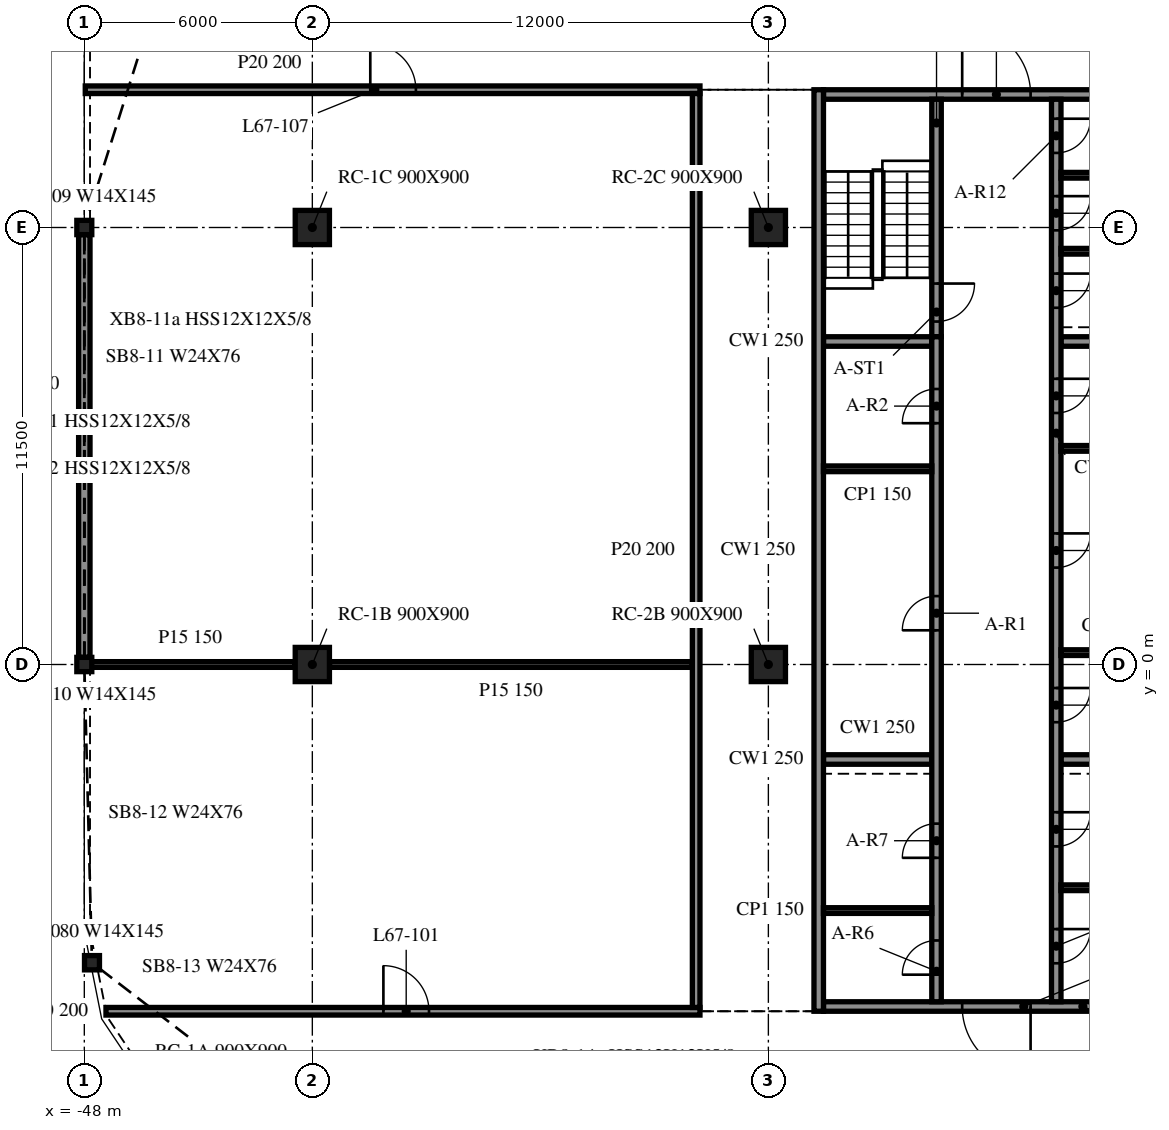
"""IFC4 building model, lengths in metres.
Left out: names, types, materials, properties, quantities, classifications, styles, units other than length and angle.
Written with IfcOpenShell. Run it as: python <this file> out.ifc"""

import sys

from ifc_helpers import new_model, si_unit, direction, frame, frame_2d, origin, origin_2d, place, context, subcontext, project, spatial, rectangle, i_section, extrude, element, fill, save


model = new_model("IFC4")
c1 = context("Model", 3, precision=1e-05, world=origin(), true_north=direction((0.0, 1.0)))
c2 = subcontext(c1, "Body", "Model", "MODEL_VIEW")
j1 = project(units=[si_unit("LENGTHUNIT", "METRE"), si_unit("PLANEANGLEUNIT", "RADIAN")], contexts=[c1])
p1 = place(None, origin())
s1 = spatial("IfcSite", under=j1, at=p1, CompositionType="ELEMENT")
p2 = place(p1, origin())
s2 = spatial("IfcBuilding", under=s1, at=p2, CompositionType="ELEMENT")
p3 = place(p2, frame((0.0, 0.0, 274.7)))
s3 = spatial("IfcBuildingStorey", under=s2, at=p3, CompositionType="ELEMENT", Elevation=274.7)
for number, where, z_axis, x_axis in (
    (1, (-42.0, 0.0, -0.34), (0.0, 0.0, 1.0), (1.0, 0.0, 0.0)),
    (2, (-42.0, 11.5, -0.34), (0.0, 0.0, 1.0), (1.0, 0.0, 0.0)),
    (3, (-30.0, 0.0, -0.34), (0.0, 0.0, 1.0), (1.0, 0.0, 0.0)),
    (4, (-30.0, 11.5, -0.34), (0.0, 0.0, 1.0), (1.0, 0.0, 0.0)),
):
    element("IfcColumn", number, at=place(p3, frame(where, z_axis=z_axis, x_axis=x_axis)), inside=s3, PredefinedType="COLUMN", context=c2, shape_type="SweptSolid", body=[
        extrude(rectangle(XDim=0.9, YDim=0.9, at=origin_2d()), origin(), (0.0, 0.0, 1.0), 3.8),
    ])
for number, where, z_axis, x_axis in (
    (5, (-48.0, 11.5, -0.34), (0.0, 0.0, 1.0), (1.0, 0.0, 0.0)),
    (6, (-48.0, 0.0, -0.34), (0.0, 0.0, 1.0), (1.0, 0.0, 0.0)),
    (7, (-47.798, -7.848, -0.34), (0.0, 0.0, 1.0), (1.0, 0.0, 0.0)),
):
    element("IfcColumn", number, at=place(p3, frame(where, z_axis=z_axis, x_axis=x_axis)), inside=s3, PredefinedType="COLUMN", context=c2, shape_type="SweptSolid", body=[
        extrude(i_section(OverallWidth=0.394, OverallDepth=0.376, WebThickness=0.017, FlangeThickness=0.028, at=origin_2d()), origin(), (0.0, 0.0, 1.0), 3.8),
    ])
p4 = place(p3, frame((-48.0, 11.312, 0.0), z_axis=(0.0, 0.0, 1.0), x_axis=(0.0, -1.0, 0.0)))
e8 = element("IfcWall", 8, at=p4, inside=s3, PredefinedType="NOTDEFINED", context=c2, shape_type="SweptSolid", body=[
    extrude(rectangle(XDim=11.124, YDim=0.3, at=frame_2d((5.562, 0.0))), origin(), (0.0, 0.0, 1.0), 2.853),
])
p5 = place(p3, frame((-28.675, 15.125, 0.0), z_axis=(0.0, 0.0, 1.0), x_axis=(0.0, -1.0, 0.0)))
e9 = element("IfcWall", 9, at=p5, inside=s3, PredefinedType="SOLIDWALL", context=c2, shape_type="SweptSolid", body=[
    extrude(rectangle(XDim=24.25, YDim=0.25, at=frame_2d((12.125, 0.0))), origin(), (0.0, 0.0, 1.0), 3.46),
])
p6 = place(p3, frame((-19.45, -9.0, 0.0), z_axis=(0.0, 0.0, 1.0), x_axis=(-1.0, 0.0, 0.0)))
e10 = element("IfcWall", 10, at=p6, inside=s3, PredefinedType="SOLIDWALL", context=c2, shape_type="SweptSolid", body=[
    extrude(rectangle(XDim=9.1, YDim=0.25, at=frame_2d((4.55, 0.0))), origin(), (0.0, 0.0, 1.0), 3.46),
])
p7 = place(p6, frame((3.65, 0.0, 0.0)))
e11 = element("IfcOpeningElement", 11, at=p7, cuts=e10, PredefinedType="OPENING", context=c2, shape_type="SweptSolid", body=[
    extrude(rectangle(XDim=1.8, YDim=2.1, at=frame_2d((0.9, 1.05))), frame((0.0, 0.135, 0.0), z_axis=(0.0, -1.0, 0.0), x_axis=(1.0, 0.0, 0.0)), (0.0, 0.0, 1.0), 0.27),
])
p8 = place(p3, frame((-28.55, 15.0, 0.0), z_axis=(0.0, 0.0, 1.0), x_axis=(1.0, 0.0, 0.0)))
e12 = element("IfcWall", 12, at=p8, inside=s3, PredefinedType="SOLIDWALL", context=c2, shape_type="SweptSolid", body=[
    extrude(rectangle(XDim=9.1, YDim=0.25, at=frame_2d((4.55, 0.0))), origin(), (0.0, 0.0, 1.0), 3.46),
])
p9 = place(p8, frame((3.65, 0.0, 0.0)))
e13 = element("IfcOpeningElement", 13, at=p9, cuts=e12, PredefinedType="OPENING", context=c2, shape_type="SweptSolid", body=[
    extrude(rectangle(XDim=1.8, YDim=2.1, at=frame_2d((0.9, 1.05))), frame((0.0, 0.135, 0.0), z_axis=(0.0, -1.0, 0.0), x_axis=(1.0, 0.0, 0.0)), (0.0, 0.0, 1.0), 0.27),
])
p10 = place(p3, frame((-25.575, -8.875, 0.0), z_axis=(0.0, 0.0, 1.0), x_axis=(0.0, 1.0, 0.0)))
e14 = element("IfcWall", 14, at=p10, inside=s3, PredefinedType="SOLIDWALL", context=c2, shape_type="SweptSolid", body=[
    extrude(rectangle(XDim=17.5, YDim=0.25, at=frame_2d((8.75, 0.0))), origin(), (0.0, 0.0, 1.0), 3.46),
])
p11 = place(p10, frame((9.775, 0.0, 0.0)))
e15 = element("IfcOpeningElement", 15, at=p11, cuts=e14, PredefinedType="OPENING", context=c2, shape_type="SweptSolid", body=[
    extrude(rectangle(XDim=0.9, YDim=2.1, at=frame_2d((0.45, 1.05))), frame((0.0, 0.135, 0.0), z_axis=(0.0, -1.0, 0.0), x_axis=(1.0, 0.0, 0.0)), (0.0, 0.0, 1.0), 0.27),
])
p12 = place(p10, frame((15.225, 0.0, 0.0)))
e16 = element("IfcOpeningElement", 16, at=p12, cuts=e14, PredefinedType="OPENING", context=c2, shape_type="SweptSolid", body=[
    extrude(rectangle(XDim=0.9, YDim=2.1, at=frame_2d((0.45, 1.05))), frame((0.0, 0.135, 0.0), z_axis=(0.0, -1.0, 0.0), x_axis=(1.0, 0.0, 0.0)), (0.0, 0.0, 1.0), 0.27),
])
p13 = place(p10, frame((0.712, 0.0, 0.0)))
e17 = element("IfcOpeningElement", 17, at=p13, cuts=e14, PredefinedType="OPENING", context=c2, shape_type="SweptSolid", body=[
    extrude(rectangle(XDim=0.9, YDim=2.1, at=frame_2d((0.45, 1.05))), frame((0.0, 0.135, 0.0), z_axis=(0.0, -1.0, 0.0), x_axis=(1.0, 0.0, 0.0)), (0.0, 0.0, 1.0), 0.27),
])
p14 = place(p10, frame((3.788, 0.0, 0.0)))
e18 = element("IfcOpeningElement", 18, at=p14, cuts=e14, PredefinedType="OPENING", context=c2, shape_type="SweptSolid", body=[
    extrude(rectangle(XDim=0.9, YDim=2.1, at=frame_2d((0.45, 1.05))), frame((0.0, 0.135, 0.0), z_axis=(0.0, -1.0, 0.0), x_axis=(1.0, 0.0, 0.0)), (0.0, 0.0, 1.0), 0.27),
])
p15 = place(p3, frame((-25.575, 14.875, 0.0), z_axis=(0.0, 0.0, 1.0), x_axis=(0.0, -1.0, 0.0)))
e19 = element("IfcWall", 19, at=p15, inside=s3, PredefinedType="SOLIDWALL", context=c2, shape_type="SweptSolid", body=[
    extrude(rectangle(XDim=6.25, YDim=0.25, at=frame_2d((3.125, 0.0))), origin(), (0.0, 0.0, 1.0), 3.46),
])
p16 = place(p15, frame((4.85, 0.0, 0.0)))
e20 = element("IfcOpeningElement", 20, at=p16, cuts=e19, PredefinedType="OPENING", context=c2, shape_type="SweptSolid", body=[
    extrude(rectangle(XDim=1.0, YDim=2.1, at=frame_2d((0.5, 1.05))), frame((0.0, 0.135, 0.0), z_axis=(0.0, -1.0, 0.0), x_axis=(1.0, 0.0, 0.0)), (0.0, 0.0, 1.0), 0.27),
])
p17 = place(p3, frame((-22.425, 14.875, 0.0), z_axis=(0.0, 0.0, 1.0), x_axis=(0.0, -1.0, 0.0)))
e21 = element("IfcWall", 21, at=p17, inside=s3, PredefinedType="SOLIDWALL", context=c2, shape_type="SweptSolid", body=[
    extrude(rectangle(XDim=23.75, YDim=0.25, at=frame_2d((11.875, 0.0))), origin(), (0.0, 0.0, 1.0), 3.46),
])
p18 = place(p17, frame((15.494, 0.0, 0.0)))
e22 = element("IfcOpeningElement", 22, at=p18, cuts=e21, PredefinedType="OPENING", context=c2, shape_type="SweptSolid", body=[
    extrude(rectangle(XDim=0.9, YDim=2.1, at=frame_2d((0.45, 1.05))), frame((0.0, 0.135, 0.0), z_axis=(0.0, -1.0, 0.0), x_axis=(1.0, 0.0, 0.0)), (0.0, 0.0, 1.0), 0.27),
])
p19 = place(p17, frame((11.425, 0.0, 0.0)))
e23 = element("IfcOpeningElement", 23, at=p19, cuts=e21, PredefinedType="OPENING", context=c2, shape_type="SweptSolid", body=[
    extrude(rectangle(XDim=0.9, YDim=2.1, at=frame_2d((0.45, 1.05))), frame((0.0, 0.135, 0.0), z_axis=(0.0, -1.0, 0.0), x_axis=(1.0, 0.0, 0.0)), (0.0, 0.0, 1.0), 0.27),
])
p20 = place(p17, frame((7.356, 0.0, 0.0)))
e24 = element("IfcOpeningElement", 24, at=p20, cuts=e21, PredefinedType="OPENING", context=c2, shape_type="SweptSolid", body=[
    extrude(rectangle(XDim=0.9, YDim=2.1, at=frame_2d((0.45, 1.05))), frame((0.0, 0.135, 0.0), z_axis=(0.0, -1.0, 0.0), x_axis=(1.0, 0.0, 0.0)), (0.0, 0.0, 1.0), 0.27),
])
p21 = place(p17, frame((21.837, 0.0, 0.0)))
e25 = element("IfcOpeningElement", 25, at=p21, cuts=e21, PredefinedType="OPENING", context=c2, shape_type="SweptSolid", body=[
    extrude(rectangle(XDim=0.9, YDim=2.1, at=frame_2d((0.45, 1.05))), frame((0.0, 0.135, 0.0), z_axis=(0.0, -1.0, 0.0), x_axis=(1.0, 0.0, 0.0)), (0.0, 0.0, 1.0), 0.27),
])
p22 = place(p17, frame((18.762, 0.0, 0.0)))
e26 = element("IfcOpeningElement", 26, at=p22, cuts=e21, PredefinedType="OPENING", context=c2, shape_type="SweptSolid", body=[
    extrude(rectangle(XDim=0.9, YDim=2.1, at=frame_2d((0.45, 1.05))), frame((0.0, 0.135, 0.0), z_axis=(0.0, -1.0, 0.0), x_axis=(1.0, 0.0, 0.0)), (0.0, 0.0, 1.0), 0.27),
])
p23 = place(p17, frame((4.587, 0.0, 0.0)))
e27 = element("IfcOpeningElement", 27, at=p23, cuts=e21, PredefinedType="OPENING", context=c2, shape_type="SweptSolid", body=[
    extrude(rectangle(XDim=0.9, YDim=2.1, at=frame_2d((0.45, 1.05))), frame((0.0, 0.135, 0.0), z_axis=(0.0, -1.0, 0.0), x_axis=(1.0, 0.0, 0.0)), (0.0, 0.0, 1.0), 0.27),
])
p24 = place(p17, frame((2.55, 0.0, 0.0)))
e28 = element("IfcOpeningElement", 28, at=p24, cuts=e21, PredefinedType="OPENING", context=c2, shape_type="SweptSolid", body=[
    extrude(rectangle(XDim=0.9, YDim=2.1, at=frame_2d((0.45, 1.05))), frame((0.0, 0.135, 0.0), z_axis=(0.0, -1.0, 0.0), x_axis=(1.0, 0.0, 0.0)), (0.0, 0.0, 1.0), 0.27),
])
p25 = place(p17, frame((0.512, 0.0, 0.0)))
e29 = element("IfcOpeningElement", 29, at=p25, cuts=e21, PredefinedType="OPENING", context=c2, shape_type="SweptSolid", body=[
    extrude(rectangle(XDim=0.9, YDim=2.1, at=frame_2d((0.45, 1.05))), frame((0.0, 0.135, 0.0), z_axis=(0.0, -1.0, 0.0), x_axis=(1.0, 0.0, 0.0)), (0.0, 0.0, 1.0), 0.27),
])
for number, where, z_axis, x_axis in (
    (30, (-28.55, -2.5, 0.0), (0.0, 0.0, 1.0), (1.0, 0.0, 0.0)),
    (31, (-28.55, 8.5, 0.0), (0.0, 0.0, 1.0), (1.0, 0.0, 0.0)),
    (32, (-22.3, -2.5, 0.0), (0.0, 0.0, 1.0), (1.0, 0.0, 0.0)),
    (33, (-22.3, 8.5, 0.0), (0.0, 0.0, 1.0), (1.0, 0.0, 0.0)),
):
    element("IfcWall", number, at=place(p3, frame(where, z_axis=z_axis, x_axis=x_axis)), inside=s3, PredefinedType="SOLIDWALL", context=c2, shape_type="SweptSolid", body=[
        extrude(rectangle(XDim=2.85, YDim=0.25, at=frame_2d((1.425, 0.0))), origin(), (0.0, 0.0, 1.0), 3.46),
    ])
for number, where, z_axis, x_axis in (
    (34, (-28.55, 5.15, 0.0), (0.0, 0.0, 1.0), (1.0, 0.0, 0.0)),
    (35, (-22.3, 0.312, 0.0), (0.0, 0.0, 1.0), (1.0, 0.0, 0.0)),
    (36, (-22.3, 5.688, 0.0), (0.0, 0.0, 1.0), (1.0, 0.0, 0.0)),
    (37, (-28.55, -6.475, 0.0), (0.0, 0.0, 1.0), (1.0, 0.0, 0.0)),
    (38, (-22.3, -5.875, 0.0), (0.0, 0.0, 1.0), (1.0, 0.0, 0.0)),
    (39, (-22.3, 10.875, 0.0), (0.0, 0.0, 1.0), (1.0, 0.0, 0.0)),
    (40, (-22.3, 12.875, 0.0), (0.0, 0.0, 1.0), (1.0, 0.0, 0.0)),
):
    element("IfcWall", number, at=place(p3, frame(where, z_axis=z_axis, x_axis=x_axis)), inside=s3, PredefinedType="PARTITIONING", context=c2, shape_type="SweptSolid", body=[
        extrude(rectangle(XDim=2.85, YDim=0.15, at=frame_2d((1.425, 0.0))), origin(), (0.0, 0.0, 1.0), 3.46),
    ])
p26 = place(p3, frame((-47.43, -9.125, 0.0), z_axis=(0.0, 0.0, 1.0), x_axis=(1.0, 0.0, 0.0)))
e41 = element("IfcWall", 41, at=p26, inside=s3, PredefinedType="PARTITIONING", context=c2, shape_type="SweptSolid", body=[
    extrude(rectangle(XDim=15.63, YDim=0.2, at=frame_2d((7.815, 0.0))), origin(), (0.0, 0.0, 1.0), 3.46),
])
p27 = place(p26, frame((7.3, 0.0, 0.0)))
e42 = element("IfcOpeningElement", 42, at=p27, cuts=e41, PredefinedType="OPENING", context=c2, shape_type="SweptSolid", body=[
    extrude(rectangle(XDim=1.2, YDim=2.1, at=frame_2d((0.6, 1.05))), frame((0.0, 0.11, 0.0), z_axis=(0.0, -1.0, 0.0), x_axis=(1.0, 0.0, 0.0)), (0.0, 0.0, 1.0), 0.22),
])
p28 = place(p3, frame((-47.975, 0.0, 0.0), z_axis=(0.0, 0.0, 1.0), x_axis=(1.0, 0.0, 0.0)))
e43 = element("IfcWall", 43, at=p28, inside=s3, PredefinedType="PARTITIONING", context=c2, shape_type="SweptSolid", body=[
    extrude(rectangle(XDim=5.525, YDim=0.15, at=frame_2d((2.763, 0.0))), origin(), (0.0, 0.0, 1.0), 3.46),
])
p29 = place(p3, frame((-41.55, 0.0, 0.0), z_axis=(0.0, 0.0, 1.0), x_axis=(1.0, 0.0, 0.0)))
e44 = element("IfcWall", 44, at=p29, inside=s3, PredefinedType="PARTITIONING", context=c2, shape_type="SweptSolid", body=[
    extrude(rectangle(XDim=9.55, YDim=0.15, at=frame_2d((4.775, 0.0))), origin(), (0.0, 0.0, 1.0), 3.46),
])
p30 = place(p3, frame((-47.975, 15.125, 0.0), z_axis=(0.0, 0.0, 1.0), x_axis=(1.0, 0.0, 0.0)))
e45 = element("IfcWall", 45, at=p30, inside=s3, PredefinedType="PARTITIONING", context=c2, shape_type="SweptSolid", body=[
    extrude(rectangle(XDim=16.175, YDim=0.2, at=frame_2d((8.087, 0.0))), origin(), (0.0, 0.0, 1.0), 3.46),
])
p31 = place(p30, frame((7.5, 0.0, 0.0)))
e46 = element("IfcOpeningElement", 46, at=p31, cuts=e45, PredefinedType="OPENING", context=c2, shape_type="SweptSolid", body=[
    extrude(rectangle(XDim=1.2, YDim=2.1, at=frame_2d((0.6, 1.05))), frame((0.0, 0.11, 0.0), z_axis=(0.0, -1.0, 0.0), x_axis=(1.0, 0.0, 0.0)), (0.0, 0.0, 1.0), 0.22),
])
p32 = place(p3, frame((-31.9, -9.025, 0.0), z_axis=(0.0, 0.0, 1.0), x_axis=(0.0, 1.0, 0.0)))
e47 = element("IfcWall", 47, at=p32, inside=s3, PredefinedType="PARTITIONING", context=c2, shape_type="SweptSolid", body=[
    extrude(rectangle(XDim=24.05, YDim=0.2, at=frame_2d((12.025, 0.0))), origin(), (0.0, 0.0, 1.0), 3.46),
])
p33 = place(p7, origin())
e48 = element("IfcDoor", 48, at=p33, inside=s3, OperationType="DOUBLE_DOOR_SINGLE_SWING", PredefinedType="DOOR", context=c2, shape_type="SweptSolid", body=[
    extrude(rectangle(XDim=1.8, YDim=2.1, at=frame_2d((0.9, 1.05))), frame((0.0, 0.025, 0.0), z_axis=(0.0, -1.0, 0.0), x_axis=(1.0, 0.0, 0.0)), (0.0, 0.0, 1.0), 0.05),
])
fill(e11, e48)
p34 = place(p9, origin())
e49 = element("IfcDoor", 49, at=p34, inside=s3, OperationType="DOUBLE_DOOR_SINGLE_SWING", PredefinedType="DOOR", context=c2, shape_type="SweptSolid", body=[
    extrude(rectangle(XDim=1.8, YDim=2.1, at=frame_2d((0.9, 1.05))), frame((0.0, 0.025, 0.0), z_axis=(0.0, -1.0, 0.0), x_axis=(1.0, 0.0, 0.0)), (0.0, 0.0, 1.0), 0.05),
])
fill(e13, e49)
p35 = place(p11, origin())
e50 = element("IfcDoor", 50, at=p35, inside=s3, OperationType="SINGLE_SWING_LEFT", PredefinedType="DOOR", context=c2, shape_type="SweptSolid", body=[
    extrude(rectangle(XDim=0.9, YDim=2.1, at=frame_2d((0.45, 1.05))), frame((0.0, 0.025, 0.0), z_axis=(0.0, -1.0, 0.0), x_axis=(1.0, 0.0, 0.0)), (0.0, 0.0, 1.0), 0.05),
])
fill(e15, e50)
p36 = place(p12, origin())
e51 = element("IfcDoor", 51, at=p36, inside=s3, OperationType="SINGLE_SWING_RIGHT", PredefinedType="DOOR", context=c2, shape_type="SweptSolid", body=[
    extrude(rectangle(XDim=0.9, YDim=2.1, at=frame_2d((0.45, 1.05))), frame((0.0, 0.025, 0.0), z_axis=(0.0, -1.0, 0.0), x_axis=(1.0, 0.0, 0.0)), (0.0, 0.0, 1.0), 0.05),
])
fill(e16, e51)
p37 = place(p18, origin())
e52 = element("IfcDoor", 52, at=p37, inside=s3, OperationType="SINGLE_SWING_LEFT", PredefinedType="DOOR", context=c2, shape_type="SweptSolid", body=[
    extrude(rectangle(XDim=0.9, YDim=2.1, at=frame_2d((0.45, 1.05))), frame((0.0, 0.025, 0.0), z_axis=(0.0, -1.0, 0.0), x_axis=(1.0, 0.0, 0.0)), (0.0, 0.0, 1.0), 0.05),
])
fill(e22, e52)
p38 = place(p19, origin())
e53 = element("IfcDoor", 53, at=p38, inside=s3, OperationType="SINGLE_SWING_RIGHT", PredefinedType="DOOR", context=c2, shape_type="SweptSolid", body=[
    extrude(rectangle(XDim=0.9, YDim=2.1, at=frame_2d((0.45, 1.05))), frame((0.0, 0.025, 0.0), z_axis=(0.0, -1.0, 0.0), x_axis=(1.0, 0.0, 0.0)), (0.0, 0.0, 1.0), 0.05),
])
fill(e23, e53)
p39 = place(p20, origin())
e54 = element("IfcDoor", 54, at=p39, inside=s3, OperationType="SINGLE_SWING_LEFT", PredefinedType="DOOR", context=c2, shape_type="SweptSolid", body=[
    extrude(rectangle(XDim=0.9, YDim=2.1, at=frame_2d((0.45, 1.05))), frame((0.0, 0.025, 0.0), z_axis=(0.0, -1.0, 0.0), x_axis=(1.0, 0.0, 0.0)), (0.0, 0.0, 1.0), 0.05),
])
fill(e24, e54)
p40 = place(p13, origin())
e55 = element("IfcDoor", 55, at=p40, inside=s3, OperationType="SINGLE_SWING_RIGHT", PredefinedType="DOOR", context=c2, shape_type="SweptSolid", body=[
    extrude(rectangle(XDim=0.9, YDim=2.1, at=frame_2d((0.45, 1.05))), frame((0.0, 0.025, 0.0), z_axis=(0.0, -1.0, 0.0), x_axis=(1.0, 0.0, 0.0)), (0.0, 0.0, 1.0), 0.05),
])
fill(e17, e55)
p41 = place(p14, origin())
e56 = element("IfcDoor", 56, at=p41, inside=s3, OperationType="SINGLE_SWING_LEFT", PredefinedType="DOOR", context=c2, shape_type="SweptSolid", body=[
    extrude(rectangle(XDim=0.9, YDim=2.1, at=frame_2d((0.45, 1.05))), frame((0.0, 0.025, 0.0), z_axis=(0.0, -1.0, 0.0), x_axis=(1.0, 0.0, 0.0)), (0.0, 0.0, 1.0), 0.05),
])
fill(e18, e56)
p42 = place(p21, origin())
e57 = element("IfcDoor", 57, at=p42, inside=s3, OperationType="SINGLE_SWING_RIGHT", PredefinedType="DOOR", context=c2, shape_type="SweptSolid", body=[
    extrude(rectangle(XDim=0.9, YDim=2.1, at=frame_2d((0.45, 1.05))), frame((0.0, 0.025, 0.0), z_axis=(0.0, -1.0, 0.0), x_axis=(1.0, 0.0, 0.0)), (0.0, 0.0, 1.0), 0.05),
])
fill(e25, e57)
p43 = place(p22, origin())
e58 = element("IfcDoor", 58, at=p43, inside=s3, OperationType="SINGLE_SWING_LEFT", PredefinedType="DOOR", context=c2, shape_type="SweptSolid", body=[
    extrude(rectangle(XDim=0.9, YDim=2.1, at=frame_2d((0.45, 1.05))), frame((0.0, 0.025, 0.0), z_axis=(0.0, -1.0, 0.0), x_axis=(1.0, 0.0, 0.0)), (0.0, 0.0, 1.0), 0.05),
])
fill(e26, e58)
p44 = place(p23, origin())
e59 = element("IfcDoor", 59, at=p44, inside=s3, OperationType="SINGLE_SWING_RIGHT", PredefinedType="DOOR", context=c2, shape_type="SweptSolid", body=[
    extrude(rectangle(XDim=0.9, YDim=2.1, at=frame_2d((0.45, 1.05))), frame((0.0, 0.025, 0.0), z_axis=(0.0, -1.0, 0.0), x_axis=(1.0, 0.0, 0.0)), (0.0, 0.0, 1.0), 0.05),
])
fill(e27, e59)
p45 = place(p24, origin())
e60 = element("IfcDoor", 60, at=p45, inside=s3, OperationType="SINGLE_SWING_LEFT", PredefinedType="DOOR", context=c2, shape_type="SweptSolid", body=[
    extrude(rectangle(XDim=0.9, YDim=2.1, at=frame_2d((0.45, 1.05))), frame((0.0, 0.025, 0.0), z_axis=(0.0, -1.0, 0.0), x_axis=(1.0, 0.0, 0.0)), (0.0, 0.0, 1.0), 0.05),
])
fill(e28, e60)
p46 = place(p25, origin())
e61 = element("IfcDoor", 61, at=p46, inside=s3, OperationType="SINGLE_SWING_RIGHT", PredefinedType="DOOR", context=c2, shape_type="SweptSolid", body=[
    extrude(rectangle(XDim=0.9, YDim=2.1, at=frame_2d((0.45, 1.05))), frame((0.0, 0.025, 0.0), z_axis=(0.0, -1.0, 0.0), x_axis=(1.0, 0.0, 0.0)), (0.0, 0.0, 1.0), 0.05),
])
fill(e29, e61)
p47 = place(p16, origin())
e62 = element("IfcDoor", 62, at=p47, inside=s3, OperationType="SINGLE_SWING_LEFT", PredefinedType="DOOR", context=c2, shape_type="SweptSolid", body=[
    extrude(rectangle(XDim=1.0, YDim=2.1, at=frame_2d((0.5, 1.05))), frame((0.0, 0.025, 0.0), z_axis=(0.0, -1.0, 0.0), x_axis=(1.0, 0.0, 0.0)), (0.0, 0.0, 1.0), 0.05),
])
fill(e20, e62)
p48 = place(p27, origin())
e63 = element("IfcDoor", 63, at=p48, inside=s3, OperationType="SINGLE_SWING_RIGHT", PredefinedType="DOOR", context=c2, shape_type="SweptSolid", body=[
    extrude(rectangle(XDim=1.2, YDim=2.1, at=frame_2d((0.6, 1.05))), frame((0.0, 0.025, 0.0), z_axis=(0.0, -1.0, 0.0), x_axis=(1.0, 0.0, 0.0)), (0.0, 0.0, 1.0), 0.05),
])
fill(e42, e63)
p49 = place(p31, origin())
e64 = element("IfcDoor", 64, at=p49, inside=s3, OperationType="SINGLE_SWING_LEFT", PredefinedType="DOOR", context=c2, shape_type="SweptSolid", body=[
    extrude(rectangle(XDim=1.2, YDim=2.1, at=frame_2d((0.6, 1.05))), frame((0.0, 0.025, 0.0), z_axis=(0.0, -1.0, 0.0), x_axis=(1.0, 0.0, 0.0)), (0.0, 0.0, 1.0), 0.05),
])
fill(e46, e64)
save(model, sys.argv[1])
